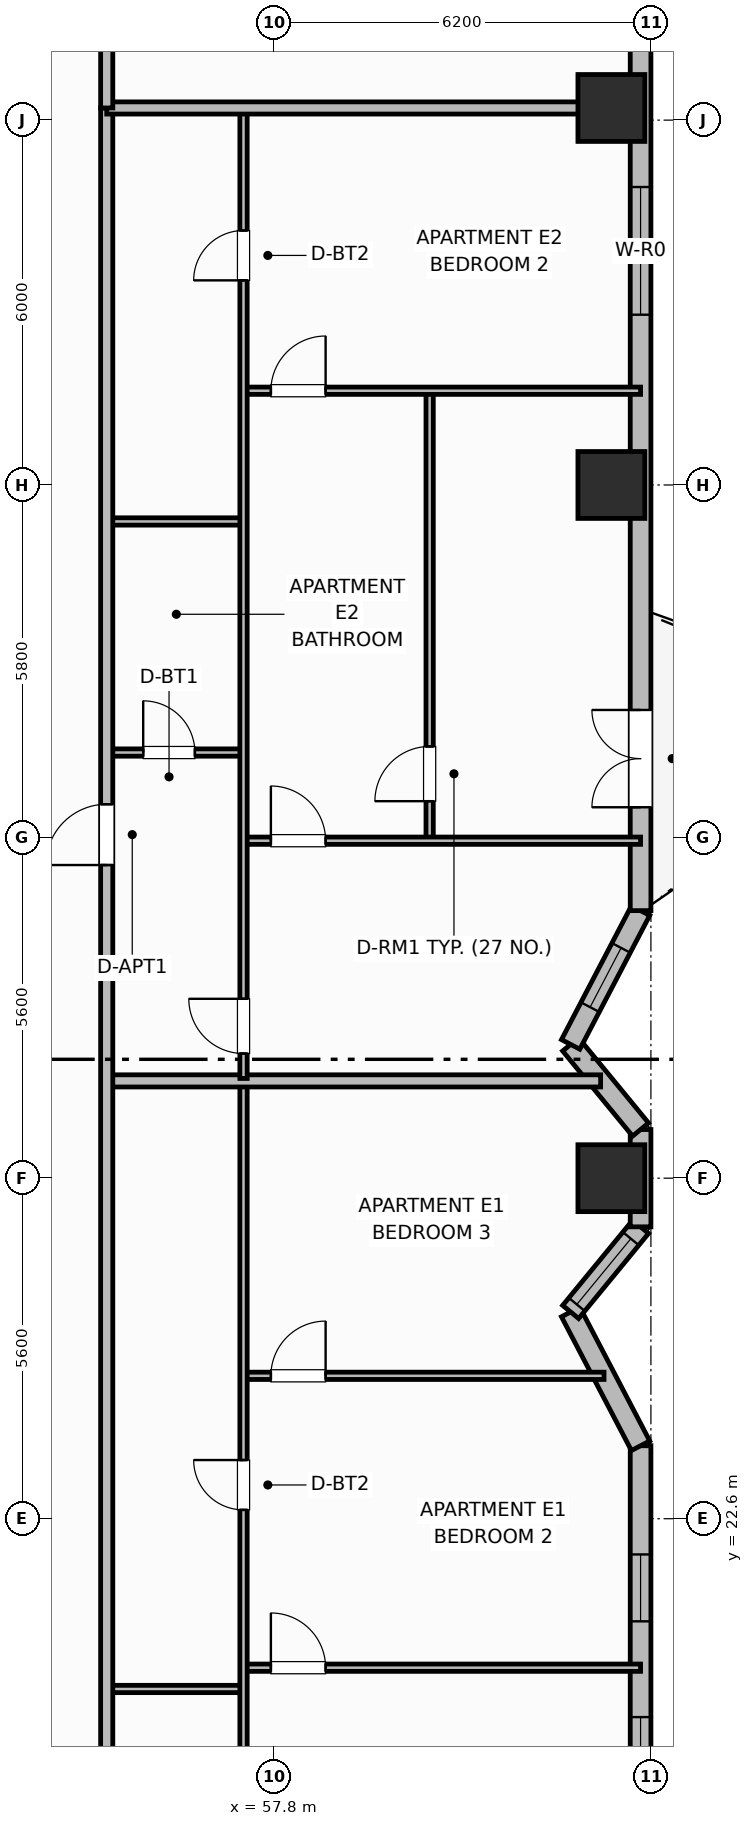
"""IFC4 building model, lengths in metres.
Left out: names, types, materials, properties, quantities, classifications, styles, units other than length and angle.
Written with IfcOpenShell. Run it as: python <this file> out.ifc"""

import sys

from ifc_helpers import new_model, si_unit, direction, frame, frame_2d, origin, origin_2d, place, context, subcontext, project, spatial, rectangle, extrude, element, fill, save


model = new_model("IFC4")
c1 = context("Model", 3, precision=1e-05, world=origin(), true_north=direction((0.0, 1.0)))
c2 = subcontext(c1, "Body", "Model", "MODEL_VIEW")
j1 = project(units=[si_unit("LENGTHUNIT", "METRE"), si_unit("PLANEANGLEUNIT", "RADIAN")], contexts=[c1])
p1 = place(None, origin())
s1 = spatial("IfcSite", under=j1, at=p1, CompositionType="ELEMENT")
p2 = place(p1, origin())
s2 = spatial("IfcBuilding", under=s1, at=p2, CompositionType="ELEMENT")
p3 = place(p2, frame((0.0, 0.0, 129.0)))
s3 = spatial("IfcBuildingStorey", under=s2, at=p3, CompositionType="ELEMENT", Elevation=129.0)
for number, where, z_axis, x_axis in (
    (1, (63.35, 28.2, 0.0), (0.0, 0.0, 1.0), (1.0, 0.0, 0.0)),
    (2, (63.35, 39.6, 0.0), (0.0, 0.0, 1.0), (1.0, 0.0, 0.0)),
    (3, (63.35, 45.8, 0.0), (0.0, 0.0, 1.0), (1.0, 0.0, 0.0)),
):
    element("IfcColumn", number, at=place(p3, frame(where, z_axis=z_axis, x_axis=x_axis)), inside=s3, PredefinedType="COLUMN", context=c2, shape_type="SweptSolid", body=[
        extrude(rectangle(XDim=1.1, YDim=1.1, at=origin_2d()), origin(), (0.0, 0.0, 1.0), 3.7),
    ])
p4 = place(p3, frame((63.83, 9.0, 0.0), z_axis=(0.0, 0.0, 1.0), x_axis=(0.0, 1.0, 0.0)))
e4 = element("IfcWall", 4, at=p4, inside=s3, PredefinedType="SOLIDWALL", context=c2, shape_type="SweptSolid", body=[
    extrude(rectangle(XDim=14.8, YDim=0.34, at=frame_2d((7.4, 0.0))), origin(), (0.0, 0.0, 1.0), 2.7),
])
p5 = place(p4, frame((2.837, 0.0, 0.93)))
e5 = element("IfcOpeningElement", 5, at=p5, cuts=e4, PredefinedType="OPENING", context=c2, shape_type="SweptSolid", body=[
    extrude(rectangle(XDim=1.1, YDim=1.65, at=frame_2d((0.55, 0.825))), frame((0.0, 0.18, 0.0), z_axis=(0.0, -1.0, 0.0), x_axis=(1.0, 0.0, 0.0)), (0.0, 0.0, 1.0), 0.36),
])
p6 = place(p4, frame((4.462, 0.0, 0.93)))
e6 = element("IfcOpeningElement", 6, at=p6, cuts=e4, PredefinedType="OPENING", context=c2, shape_type="SweptSolid", body=[
    extrude(rectangle(XDim=1.1, YDim=1.65, at=frame_2d((0.55, 0.825))), frame((0.0, 0.18, 0.0), z_axis=(0.0, -1.0, 0.0), x_axis=(1.0, 0.0, 0.0)), (0.0, 0.0, 1.0), 0.36),
])
p7 = place(p4, frame((9.238, 0.0, 0.93)))
e7 = element("IfcOpeningElement", 7, at=p7, cuts=e4, PredefinedType="OPENING", context=c2, shape_type="SweptSolid", body=[
    extrude(rectangle(XDim=1.1, YDim=1.65, at=frame_2d((0.55, 0.825))), frame((0.0, 0.18, 0.0), z_axis=(0.0, -1.0, 0.0), x_axis=(1.0, 0.0, 0.0)), (0.0, 0.0, 1.0), 0.36),
])
p8 = place(p4, frame((11.913, 0.0, 0.93)))
e8 = element("IfcOpeningElement", 8, at=p8, cuts=e4, PredefinedType="OPENING", context=c2, shape_type="SweptSolid", body=[
    extrude(rectangle(XDim=1.1, YDim=1.65, at=frame_2d((0.55, 0.825))), frame((0.0, 0.18, 0.0), z_axis=(0.0, -1.0, 0.0), x_axis=(1.0, 0.0, 0.0)), (0.0, 0.0, 1.0), 0.36),
])
p9 = place(p3, frame((63.83, 23.8, 0.0), z_axis=(0.0, 0.0, 1.0), x_axis=(-0.463308627993, 0.886196995722, 0.0)))
e9 = element("IfcWall", 9, at=p9, inside=s3, PredefinedType="SOLIDWALL", context=c2, shape_type="SweptSolid", body=[
    extrude(rectangle(XDim=2.482, YDim=0.34, at=frame_2d((1.241, 0.0))), origin(), (0.0, 0.0, 1.0), 2.7),
])
p10 = place(p3, frame((62.68, 26.0, 0.0), z_axis=(0.0, 0.0, 1.0), x_axis=(0.634814134075, 0.772664878961, 0.0)))
e10 = element("IfcWall", 10, at=p10, inside=s3, PredefinedType="SOLIDWALL", context=c2, shape_type="SweptSolid", body=[
    extrude(rectangle(XDim=1.812, YDim=0.34, at=frame_2d((0.906, 0.0))), origin(), (0.0, 0.0, 1.0), 2.7),
])
p11 = place(p10, frame((0.16, 0.0, 0.69)))
e11 = element("IfcOpeningElement", 11, at=p11, cuts=e10, PredefinedType="OPENING", context=c2, shape_type="SweptSolid", body=[
    extrude(rectangle(XDim=1.4, YDim=1.85, at=frame_2d((0.7, 0.925))), frame((0.0, 0.18, 0.0), z_axis=(0.0, -1.0, 0.0), x_axis=(1.0, 0.0, 0.0)), (0.0, 0.0, 1.0), 0.36),
])
p12 = place(p3, frame((63.83, 27.4, 0.0), z_axis=(0.0, 0.0, 1.0), x_axis=(0.0, 1.0, 0.0)))
e12 = element("IfcWall", 12, at=p12, inside=s3, PredefinedType="SOLIDWALL", context=c2, shape_type="SweptSolid", body=[
    extrude(rectangle(XDim=1.6, YDim=0.34, at=frame_2d((0.8, 0.0))), origin(), (0.0, 0.0, 1.0), 2.7),
])
p13 = place(p3, frame((63.83, 29.0, 0.0), z_axis=(0.0, 0.0, 1.0), x_axis=(-0.634814134075, 0.772664878961, 0.0)))
e13 = element("IfcWall", 13, at=p13, inside=s3, PredefinedType="SOLIDWALL", context=c2, shape_type="SweptSolid", body=[
    extrude(rectangle(XDim=1.812, YDim=0.34, at=frame_2d((0.906, 0.0))), origin(), (0.0, 0.0, 1.0), 2.7),
])
p14 = place(p3, frame((62.68, 30.4, 0.0), z_axis=(0.0, 0.0, 1.0), x_axis=(0.46326825181, 0.88621810344, 0.0)))
e14 = element("IfcWall", 14, at=p14, inside=s3, PredefinedType="SOLIDWALL", context=c2, shape_type="SweptSolid", body=[
    extrude(rectangle(XDim=2.483, YDim=0.34, at=frame_2d((1.241, 0.0))), origin(), (0.0, 0.0, 1.0), 2.7),
])
p15 = place(p14, frame((0.691, 0.0, 0.89)))
e15 = element("IfcOpeningElement", 15, at=p15, cuts=e14, PredefinedType="OPENING", context=c2, shape_type="SweptSolid", body=[
    extrude(rectangle(XDim=1.1, YDim=1.65, at=frame_2d((0.55, 0.825))), frame((0.0, 0.18, 0.0), z_axis=(0.0, -1.0, 0.0), x_axis=(1.0, 0.0, 0.0)), (0.0, 0.0, 1.0), 0.36),
])
p16 = place(p3, frame((63.83, 32.6, 0.0), z_axis=(0.0, 0.0, 1.0), x_axis=(0.0, 1.0, 0.0)))
e16 = element("IfcWall", 16, at=p16, inside=s3, PredefinedType="SOLIDWALL", context=c2, shape_type="SweptSolid", body=[
    extrude(rectangle(XDim=14.8, YDim=0.34, at=frame_2d((7.4, 0.0))), origin(), (0.0, 0.0, 1.0), 2.7),
])
p17 = place(p16, frame((1.7, 0.0, 0.0)))
e17 = element("IfcOpeningElement", 17, at=p17, cuts=e16, PredefinedType="OPENING", context=c2, shape_type="SweptSolid", body=[
    extrude(rectangle(XDim=1.6, YDim=2.1, at=frame_2d((0.8, 1.05))), frame((0.0, 0.18, 0.0), z_axis=(0.0, -1.0, 0.0), x_axis=(1.0, 0.0, 0.0)), (0.0, 0.0, 1.0), 0.36),
])
p18 = place(p16, frame((9.8, 0.0, 0.68)))
e18 = element("IfcOpeningElement", 18, at=p18, cuts=e16, PredefinedType="OPENING", context=c2, shape_type="SweptSolid", body=[
    extrude(rectangle(XDim=2.1, YDim=1.9, at=frame_2d((1.05, 0.95))), frame((0.0, 0.18, 0.0), z_axis=(0.0, -1.0, 0.0), x_axis=(1.0, 0.0, 0.0)), (0.0, 0.0, 1.0), 0.36),
])
p19 = place(p3, frame((55.05, 19.8, 0.0), z_axis=(0.0, 0.0, 1.0), x_axis=(1.0, 0.0, 0.0)))
e19 = element("IfcWall", 19, at=p19, inside=s3, PredefinedType="PARTITIONING", context=c2, shape_type="SweptSolid", body=[
    extrude(rectangle(XDim=2.25, YDim=0.12, at=frame_2d((1.125, 0.0))), origin(), (0.0, 0.0, 1.0), 2.53),
])
p20 = place(p3, frame((57.3, 20.15, 0.0), z_axis=(0.0, 0.0, 1.0), x_axis=(1.0, 0.0, 0.0)))
e20 = element("IfcWall", 20, at=p20, inside=s3, PredefinedType="PARTITIONING", context=c2, shape_type="SweptSolid", body=[
    extrude(rectangle(XDim=6.53, YDim=0.12, at=frame_2d((3.265, 0.0))), origin(), (0.0, 0.0, 1.0), 2.53),
])
p21 = place(p20, frame((0.45, 0.0, 0.0)))
e21 = element("IfcOpeningElement", 21, at=p21, cuts=e20, PredefinedType="OPENING", context=c2, shape_type="SweptSolid", body=[
    extrude(rectangle(XDim=0.9, YDim=2.1, at=frame_2d((0.45, 1.05))), frame((0.0, 0.07, 0.0), z_axis=(0.0, -1.0, 0.0), x_axis=(1.0, 0.0, 0.0)), (0.0, 0.0, 1.0), 0.14),
])
p22 = place(p3, frame((57.3, 24.95, 0.0), z_axis=(0.0, 0.0, 1.0), x_axis=(1.0, 0.0, 0.0)))
e22 = element("IfcWall", 22, at=p22, inside=s3, PredefinedType="PARTITIONING", context=c2, shape_type="SweptSolid", body=[
    extrude(rectangle(XDim=5.929, YDim=0.12, at=frame_2d((2.964, 0.0))), origin(), (0.0, 0.0, 1.0), 2.53),
])
p23 = place(p22, frame((0.45, 0.0, 0.0)))
e23 = element("IfcOpeningElement", 23, at=p23, cuts=e22, PredefinedType="OPENING", context=c2, shape_type="SweptSolid", body=[
    extrude(rectangle(XDim=0.9, YDim=2.1, at=frame_2d((0.45, 1.05))), frame((0.0, 0.07, 0.0), z_axis=(0.0, -1.0, 0.0), x_axis=(1.0, 0.0, 0.0)), (0.0, 0.0, 1.0), 0.14),
])
p24 = place(p3, frame((57.3, 10.64, 0.0), z_axis=(0.0, 0.0, 1.0), x_axis=(0.0, 1.0, 0.0)))
e24 = element("IfcWall", 24, at=p24, inside=s3, PredefinedType="PARTITIONING", context=c2, shape_type="SweptSolid", body=[
    extrude(rectangle(XDim=19.12, YDim=0.12, at=frame_2d((9.56, 0.0))), origin(), (0.0, 0.0, 1.0), 2.53),
])
p25 = place(p24, frame((0.41, 0.0, 0.0)))
e25 = element("IfcOpeningElement", 25, at=p25, cuts=e24, PredefinedType="OPENING", context=c2, shape_type="SweptSolid", body=[
    extrude(rectangle(XDim=0.9, YDim=2.1, at=frame_2d((0.45, 1.05))), frame((0.0, 0.07, 0.0), z_axis=(0.0, -1.0, 0.0), x_axis=(1.0, 0.0, 0.0)), (0.0, 0.0, 1.0), 0.14),
])
p26 = place(p24, frame((12.105, 0.0, 0.0)))
e26 = element("IfcOpeningElement", 26, at=p26, cuts=e24, PredefinedType="OPENING", context=c2, shape_type="SweptSolid", body=[
    extrude(rectangle(XDim=0.82, YDim=2.08, at=frame_2d((0.41, 1.04))), frame((0.0, 0.07, 0.0), z_axis=(0.0, -1.0, 0.0), x_axis=(1.0, 0.0, 0.0)), (0.0, 0.0, 1.0), 0.14),
])
p27 = place(p3, frame((55.05, 29.8, 0.0), z_axis=(0.0, 0.0, 1.0), x_axis=(1.0, 0.0, 0.0)))
e27 = element("IfcWall", 27, at=p27, inside=s3, PredefinedType="PARTITIONING", context=c2, shape_type="SweptSolid", body=[
    extrude(rectangle(XDim=8.123, YDim=0.2, at=frame_2d((4.062, 0.0))), origin(), (0.0, 0.0, 1.0), 2.53),
])
p28 = place(p3, frame((55.05, 35.2, 0.0), z_axis=(0.0, 0.0, 1.0), x_axis=(1.0, 0.0, 0.0)))
e28 = element("IfcWall", 28, at=p28, inside=s3, PredefinedType="PARTITIONING", context=c2, shape_type="SweptSolid", body=[
    extrude(rectangle(XDim=2.25, YDim=0.12, at=frame_2d((1.125, 0.0))), origin(), (0.0, 0.0, 1.0), 2.53),
])
p29 = place(p28, frame((0.6, 0.0, 0.0)))
e29 = element("IfcOpeningElement", 29, at=p29, cuts=e28, PredefinedType="OPENING", context=c2, shape_type="SweptSolid", body=[
    extrude(rectangle(XDim=0.85, YDim=2.1, at=frame_2d((0.425, 1.05))), frame((0.0, 0.07, 0.0), z_axis=(0.0, -1.0, 0.0), x_axis=(1.0, 0.0, 0.0)), (0.0, 0.0, 1.0), 0.14),
])
p30 = place(p3, frame((55.05, 39.0, 0.0), z_axis=(0.0, 0.0, 1.0), x_axis=(1.0, 0.0, 0.0)))
e30 = element("IfcWall", 30, at=p30, inside=s3, PredefinedType="PARTITIONING", context=c2, shape_type="SweptSolid", body=[
    extrude(rectangle(XDim=2.25, YDim=0.12, at=frame_2d((1.125, 0.0))), origin(), (0.0, 0.0, 1.0), 2.53),
])
p31 = place(p3, frame((60.361, 33.79, 0.0), z_axis=(0.0, 0.0, 1.0), x_axis=(0.0, 1.0, 0.0)))
e31 = element("IfcWall", 31, at=p31, inside=s3, PredefinedType="PARTITIONING", context=c2, shape_type="SweptSolid", body=[
    extrude(rectangle(XDim=7.32, YDim=0.12, at=frame_2d((3.66, 0.0))), origin(), (0.0, 0.0, 1.0), 2.53),
])
p32 = place(p31, frame((0.61, 0.0, 0.0)))
e32 = element("IfcOpeningElement", 32, at=p32, cuts=e31, PredefinedType="OPENING", context=c2, shape_type="SweptSolid", body=[
    extrude(rectangle(XDim=0.9, YDim=2.1, at=frame_2d((0.45, 1.05))), frame((0.0, 0.07, 0.0), z_axis=(0.0, -1.0, 0.0), x_axis=(1.0, 0.0, 0.0)), (0.0, 0.0, 1.0), 0.14),
])
p33 = place(p3, frame((57.3, 33.75, 0.0), z_axis=(0.0, 0.0, 1.0), x_axis=(1.0, 0.0, 0.0)))
e33 = element("IfcWall", 33, at=p33, inside=s3, PredefinedType="PARTITIONING", context=c2, shape_type="SweptSolid", body=[
    extrude(rectangle(XDim=6.53, YDim=0.12, at=frame_2d((3.265, 0.0))), origin(), (0.0, 0.0, 1.0), 2.53),
])
p34 = place(p33, frame((0.45, 0.0, 0.0)))
e34 = element("IfcOpeningElement", 34, at=p34, cuts=e33, PredefinedType="OPENING", context=c2, shape_type="SweptSolid", body=[
    extrude(rectangle(XDim=0.9, YDim=2.1, at=frame_2d((0.45, 1.05))), frame((0.0, 0.07, 0.0), z_axis=(0.0, -1.0, 0.0), x_axis=(1.0, 0.0, 0.0)), (0.0, 0.0, 1.0), 0.14),
])
p35 = place(p3, frame((57.3, 41.15, 0.0), z_axis=(0.0, 0.0, 1.0), x_axis=(1.0, 0.0, 0.0)))
e35 = element("IfcWall", 35, at=p35, inside=s3, PredefinedType="PARTITIONING", context=c2, shape_type="SweptSolid", body=[
    extrude(rectangle(XDim=6.53, YDim=0.12, at=frame_2d((3.265, 0.0))), origin(), (0.0, 0.0, 1.0), 2.53),
])
p36 = place(p35, frame((0.45, 0.0, 0.0)))
e36 = element("IfcOpeningElement", 36, at=p36, cuts=e35, PredefinedType="OPENING", context=c2, shape_type="SweptSolid", body=[
    extrude(rectangle(XDim=0.9, YDim=2.1, at=frame_2d((0.45, 1.05))), frame((0.0, 0.07, 0.0), z_axis=(0.0, -1.0, 0.0), x_axis=(1.0, 0.0, 0.0)), (0.0, 0.0, 1.0), 0.14),
])
p37 = place(p3, frame((57.3, 29.84, 0.0), z_axis=(0.0, 0.0, 1.0), x_axis=(0.0, 1.0, 0.0)))
e37 = element("IfcWall", 37, at=p37, inside=s3, PredefinedType="PARTITIONING", context=c2, shape_type="SweptSolid", body=[
    extrude(rectangle(XDim=15.92, YDim=0.12, at=frame_2d((7.96, 0.0))), origin(), (0.0, 0.0, 1.0), 2.53),
])
p38 = place(p37, frame((0.41, 0.0, 0.0)))
e38 = element("IfcOpeningElement", 38, at=p38, cuts=e37, PredefinedType="OPENING", context=c2, shape_type="SweptSolid", body=[
    extrude(rectangle(XDim=0.9, YDim=2.1, at=frame_2d((0.45, 1.05))), frame((0.0, 0.07, 0.0), z_axis=(0.0, -1.0, 0.0), x_axis=(1.0, 0.0, 0.0)), (0.0, 0.0, 1.0), 0.14),
])
p39 = place(p37, frame((13.125, 0.0, 0.0)))
e39 = element("IfcOpeningElement", 39, at=p39, cuts=e37, PredefinedType="OPENING", context=c2, shape_type="SweptSolid", body=[
    extrude(rectangle(XDim=0.82, YDim=2.08, at=frame_2d((0.41, 1.04))), frame((0.0, 0.07, 0.0), z_axis=(0.0, -1.0, 0.0), x_axis=(1.0, 0.0, 0.0)), (0.0, 0.0, 1.0), 0.14),
])
p40 = place(p3, frame((55.05, 10.6, 0.0), z_axis=(0.0, 0.0, 1.0), x_axis=(0.0, 1.0, 0.0)))
e40 = element("IfcWall", 40, at=p40, inside=s3, PredefinedType="PARTITIONING", context=c2, shape_type="SweptSolid", body=[
    extrude(rectangle(XDim=35.2, YDim=0.2, at=frame_2d((17.6, 0.0))), origin(), (0.0, 0.0, 1.0), 2.53),
])
p41 = place(p40, frame((2.65, 0.0, 0.0)))
e41 = element("IfcOpeningElement", 41, at=p41, cuts=e40, PredefinedType="OPENING", context=c2, shape_type="SweptSolid", body=[
    extrude(rectangle(XDim=1.0, YDim=2.15, at=frame_2d((0.5, 1.075))), frame((0.0, 0.11, 0.0), z_axis=(0.0, -1.0, 0.0), x_axis=(1.0, 0.0, 0.0)), (0.0, 0.0, 1.0), 0.22),
])
p42 = place(p40, frame((22.75, 0.0, 0.0)))
e42 = element("IfcOpeningElement", 42, at=p42, cuts=e40, PredefinedType="OPENING", context=c2, shape_type="SweptSolid", body=[
    extrude(rectangle(XDim=1.0, YDim=2.15, at=frame_2d((0.5, 1.075))), frame((0.0, 0.11, 0.0), z_axis=(0.0, -1.0, 0.0), x_axis=(1.0, 0.0, 0.0)), (0.0, 0.0, 1.0), 0.22),
])
p43 = place(p3, frame((55.05, 45.8, 0.0), z_axis=(0.0, 0.0, 1.0), x_axis=(1.0, 0.0, 0.0)))
e43 = element("IfcWall", 43, at=p43, inside=s3, PredefinedType="PARTITIONING", context=c2, shape_type="SweptSolid", body=[
    extrude(rectangle(XDim=8.36, YDim=0.2, at=frame_2d((4.18, 0.0))), origin(), (0.0, 0.0, 1.0), 2.53),
])
p44 = place(p3, frame((55.05, 45.8, 0.0), z_axis=(0.0, 0.0, 1.0), x_axis=(0.0, 1.0, 0.0)))
e44 = element("IfcWall", 44, at=p44, inside=s3, PredefinedType="PARTITIONING", context=c2, shape_type="SweptSolid", body=[
    extrude(rectangle(XDim=5.63, YDim=0.2, at=frame_2d((2.815, 0.0))), origin(), (0.0, 0.0, 1.0), 2.53),
])
p45 = place(p7, origin())
e45 = element("IfcWindow", 45, at=p45, inside=s3, PartitioningType="SINGLE_PANEL", PredefinedType="WINDOW", context=c2, shape_type="SweptSolid", body=[
    extrude(rectangle(XDim=1.1, YDim=1.65, at=frame_2d((0.55, 0.825))), frame((0.0, 0.03, 0.0), z_axis=(0.0, -1.0, 0.0), x_axis=(1.0, 0.0, 0.0)), (0.0, 0.0, 1.0), 0.06),
])
fill(e7, e45)
p46 = place(p8, origin())
e46 = element("IfcWindow", 46, at=p46, inside=s3, PartitioningType="SINGLE_PANEL", PredefinedType="WINDOW", context=c2, shape_type="SweptSolid", body=[
    extrude(rectangle(XDim=1.1, YDim=1.65, at=frame_2d((0.55, 0.825))), frame((0.0, 0.03, 0.0), z_axis=(0.0, -1.0, 0.0), x_axis=(1.0, 0.0, 0.0)), (0.0, 0.0, 1.0), 0.06),
])
fill(e8, e46)
p47 = place(p11, origin())
e47 = element("IfcWindow", 47, at=p47, inside=s3, PartitioningType="SINGLE_PANEL", PredefinedType="WINDOW", context=c2, shape_type="SweptSolid", body=[
    extrude(rectangle(XDim=1.4, YDim=1.85, at=frame_2d((0.7, 0.925))), frame((0.0, 0.03, 0.0), z_axis=(0.0, -1.0, 0.0), x_axis=(1.0, 0.0, 0.0)), (0.0, 0.0, 1.0), 0.06),
])
fill(e11, e47)
p48 = place(p15, origin())
e48 = element("IfcWindow", 48, at=p48, inside=s3, PartitioningType="SINGLE_PANEL", PredefinedType="WINDOW", context=c2, shape_type="SweptSolid", body=[
    extrude(rectangle(XDim=1.1, YDim=1.65, at=frame_2d((0.55, 0.825))), frame((0.0, 0.03, 0.0), z_axis=(0.0, -1.0, 0.0), x_axis=(1.0, 0.0, 0.0)), (0.0, 0.0, 1.0), 0.06),
])
fill(e15, e48)
p49 = place(p17, origin())
e49 = element("IfcDoor", 49, at=p49, inside=s3, OperationType="DOUBLE_DOOR_SINGLE_SWING", PredefinedType="DOOR", context=c2, shape_type="SweptSolid", body=[
    extrude(rectangle(XDim=1.6, YDim=2.1, at=frame_2d((0.8, 1.05))), frame((0.0, 0.025, 0.0), z_axis=(0.0, -1.0, 0.0), x_axis=(1.0, 0.0, 0.0)), (0.0, 0.0, 1.0), 0.05),
])
fill(e17, e49)
p50 = place(p18, origin())
e50 = element("IfcWindow", 50, at=p50, inside=s3, PartitioningType="SINGLE_PANEL", PredefinedType="WINDOW", context=c2, shape_type="SweptSolid", body=[
    extrude(rectangle(XDim=2.1, YDim=1.9, at=frame_2d((1.05, 0.95))), frame((0.0, 0.03, 0.0), z_axis=(0.0, -1.0, 0.0), x_axis=(1.0, 0.0, 0.0)), (0.0, 0.0, 1.0), 0.06),
])
fill(e18, e50)
p51 = place(p21, origin())
e51 = element("IfcDoor", 51, at=p51, inside=s3, OperationType="SINGLE_SWING_LEFT", PredefinedType="DOOR", context=c2, shape_type="SweptSolid", body=[
    extrude(rectangle(XDim=0.9, YDim=2.1, at=frame_2d((0.45, 1.05))), frame((0.0, 0.025, 0.0), z_axis=(0.0, -1.0, 0.0), x_axis=(1.0, 0.0, 0.0)), (0.0, 0.0, 1.0), 0.05),
])
fill(e21, e51)
p52 = place(p23, origin())
e52 = element("IfcDoor", 52, at=p52, inside=s3, OperationType="SINGLE_SWING_RIGHT", PredefinedType="DOOR", context=c2, shape_type="SweptSolid", body=[
    extrude(rectangle(XDim=0.9, YDim=2.1, at=frame_2d((0.45, 1.05))), frame((0.0, 0.025, 0.0), z_axis=(0.0, -1.0, 0.0), x_axis=(1.0, 0.0, 0.0)), (0.0, 0.0, 1.0), 0.05),
])
fill(e23, e52)
p53 = place(p26, origin())
e53 = element("IfcDoor", 53, at=p53, inside=s3, OperationType="SINGLE_SWING_RIGHT", PredefinedType="DOOR", context=c2, shape_type="SweptSolid", body=[
    extrude(rectangle(XDim=0.82, YDim=2.08, at=frame_2d((0.41, 1.04))), frame((0.0, 0.025, 0.0), z_axis=(0.0, -1.0, 0.0), x_axis=(1.0, 0.0, 0.0)), (0.0, 0.0, 1.0), 0.05),
])
fill(e26, e53)
p54 = place(p29, origin())
e54 = element("IfcDoor", 54, at=p54, inside=s3, OperationType="SINGLE_SWING_LEFT", PredefinedType="DOOR", context=c2, shape_type="SweptSolid", body=[
    extrude(rectangle(XDim=0.85, YDim=2.1, at=frame_2d((0.425, 1.05))), frame((0.0, 0.025, 0.0), z_axis=(0.0, -1.0, 0.0), x_axis=(1.0, 0.0, 0.0)), (0.0, 0.0, 1.0), 0.05),
])
fill(e29, e54)
p55 = place(p32, origin())
e55 = element("IfcDoor", 55, at=p55, inside=s3, OperationType="SINGLE_SWING_LEFT", PredefinedType="DOOR", context=c2, shape_type="SweptSolid", body=[
    extrude(rectangle(XDim=0.9, YDim=2.1, at=frame_2d((0.45, 1.05))), frame((0.0, 0.025, 0.0), z_axis=(0.0, -1.0, 0.0), x_axis=(1.0, 0.0, 0.0)), (0.0, 0.0, 1.0), 0.05),
])
fill(e32, e55)
p56 = place(p34, origin())
e56 = element("IfcDoor", 56, at=p56, inside=s3, OperationType="SINGLE_SWING_LEFT", PredefinedType="DOOR", context=c2, shape_type="SweptSolid", body=[
    extrude(rectangle(XDim=0.9, YDim=2.1, at=frame_2d((0.45, 1.05))), frame((0.0, 0.025, 0.0), z_axis=(0.0, -1.0, 0.0), x_axis=(1.0, 0.0, 0.0)), (0.0, 0.0, 1.0), 0.05),
])
fill(e34, e56)
p57 = place(p36, origin())
e57 = element("IfcDoor", 57, at=p57, inside=s3, OperationType="SINGLE_SWING_RIGHT", PredefinedType="DOOR", context=c2, shape_type="SweptSolid", body=[
    extrude(rectangle(XDim=0.9, YDim=2.1, at=frame_2d((0.45, 1.05))), frame((0.0, 0.025, 0.0), z_axis=(0.0, -1.0, 0.0), x_axis=(1.0, 0.0, 0.0)), (0.0, 0.0, 1.0), 0.05),
])
fill(e36, e57)
p58 = place(p38, origin())
e58 = element("IfcDoor", 58, at=p58, inside=s3, OperationType="SINGLE_SWING_RIGHT", PredefinedType="DOOR", context=c2, shape_type="SweptSolid", body=[
    extrude(rectangle(XDim=0.9, YDim=2.1, at=frame_2d((0.45, 1.05))), frame((0.0, 0.025, 0.0), z_axis=(0.0, -1.0, 0.0), x_axis=(1.0, 0.0, 0.0)), (0.0, 0.0, 1.0), 0.05),
])
fill(e38, e58)
p59 = place(p39, origin())
e59 = element("IfcDoor", 59, at=p59, inside=s3, OperationType="SINGLE_SWING_LEFT", PredefinedType="DOOR", context=c2, shape_type="SweptSolid", body=[
    extrude(rectangle(XDim=0.82, YDim=2.08, at=frame_2d((0.41, 1.04))), frame((0.0, 0.025, 0.0), z_axis=(0.0, -1.0, 0.0), x_axis=(1.0, 0.0, 0.0)), (0.0, 0.0, 1.0), 0.05),
])
fill(e39, e59)
p60 = place(p42, origin())
e60 = element("IfcDoor", 60, at=p60, inside=s3, OperationType="SINGLE_SWING_LEFT", PredefinedType="DOOR", context=c2, shape_type="SweptSolid", body=[
    extrude(rectangle(XDim=1.0, YDim=2.15, at=frame_2d((0.5, 1.075))), frame((0.0, 0.025, 0.0), z_axis=(0.0, -1.0, 0.0), x_axis=(1.0, 0.0, 0.0)), (0.0, 0.0, 1.0), 0.05),
])
fill(e42, e60)
save(model, sys.argv[1])
